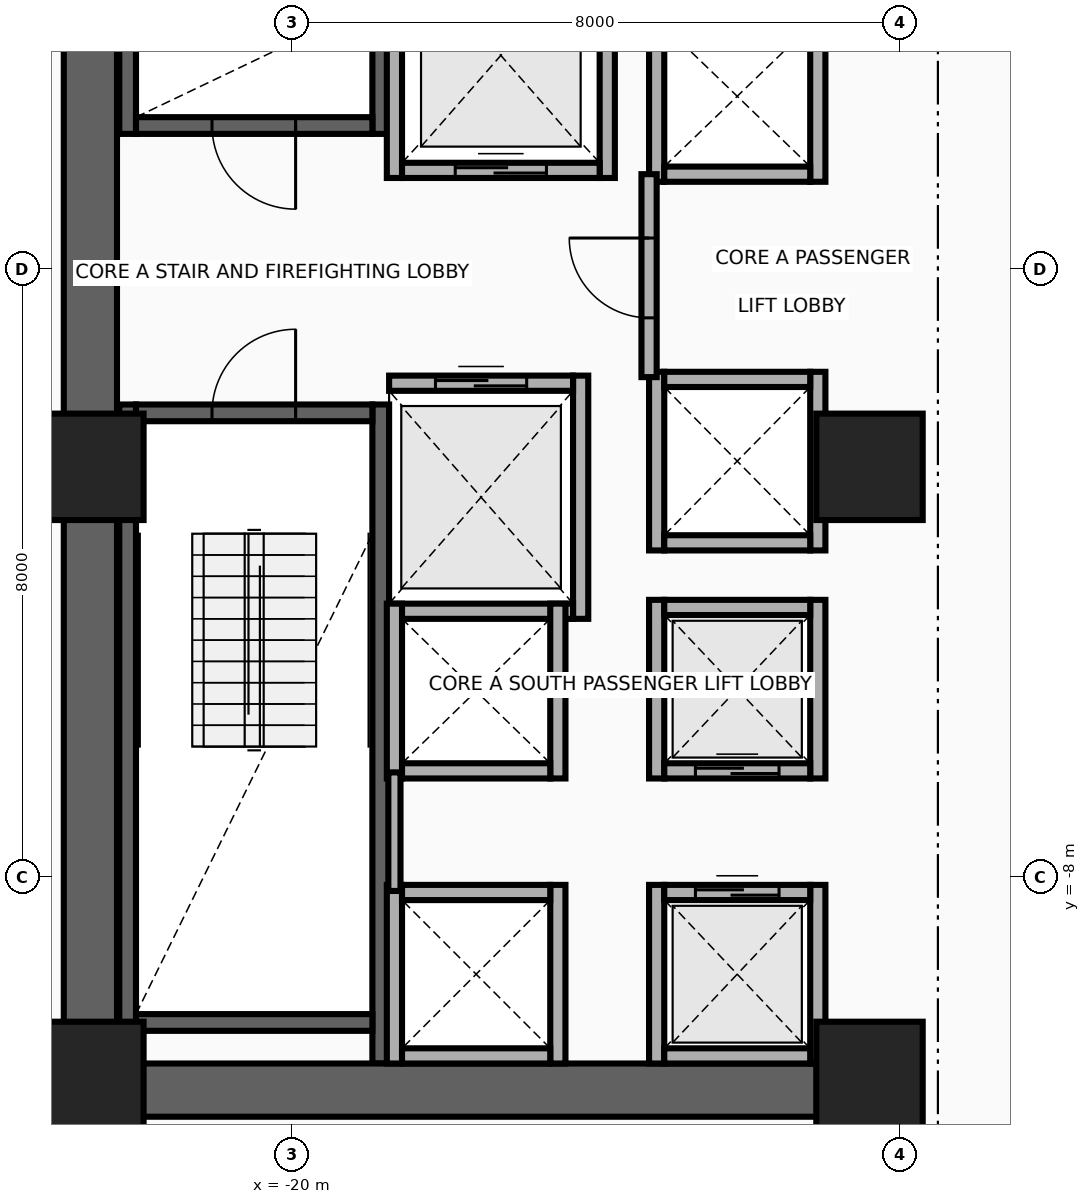
"""IFC4 building model, lengths in metres.
Left out: names, types, materials, properties, quantities, classifications, styles, units other than length and angle.
Written with IfcOpenShell. Run it as: python <this file> out.ifc"""

import sys

from ifc_helpers import new_model, si_unit, direction, frame, frame_2d, origin, origin_2d, place, context, subcontext, project, spatial, rectangle, extrude, source, transform, mapped, element, fill, save


model = new_model("IFC4")
c1 = context("Model", 3, precision=1e-05, world=origin(), true_north=direction((0.0, 1.0)))
c2 = subcontext(c1, "Body", "Model", "MODEL_VIEW")
j1 = project(units=[si_unit("LENGTHUNIT", "METRE"), si_unit("PLANEANGLEUNIT", "RADIAN")], contexts=[c1])
p1 = place(None, origin())
s1 = spatial("IfcSite", under=j1, at=p1, CompositionType="ELEMENT")
p2 = place(p1, origin())
s2 = spatial("IfcBuilding", under=s1, at=p2, CompositionType="ELEMENT")
p3 = place(p2, frame((0.0, 0.0, 74.1)))
s3 = spatial("IfcBuildingStorey", under=s2, at=p3, CompositionType="ELEMENT", Elevation=74.1)
for number, where, z_axis, x_axis in (
    (1, (-22.16, 1.78, 0.0), (0.0, 0.0, 1.0), (0.0, 1.0, 0.0)),
    (2, (-18.83, 1.78, 0.0), (0.0, 0.0, 1.0), (0.0, 1.0, 0.0)),
):
    element("IfcWall", number, at=place(p3, frame(where, z_axis=z_axis, x_axis=x_axis)), inside=s3, PredefinedType="SHEAR", context=c2, shape_type="SweptSolid", body=[
        extrude(rectangle(XDim=8.67, YDim=0.22, at=frame_2d((4.335, 0.0))), origin(), (0.0, 0.0, 1.0), 3.46),
    ])
p4 = place(p3, frame((-22.05, 1.89, 0.0), z_axis=(0.0, 0.0, 1.0), x_axis=(1.0, 0.0, 0.0)))
e3 = element("IfcWall", 3, at=p4, inside=s3, PredefinedType="SHEAR", context=c2, shape_type="SweptSolid", body=[
    extrude(rectangle(XDim=3.11, YDim=0.22, at=frame_2d((1.555, 0.0))), origin(), (0.0, 0.0, 1.0), 3.46),
])
p5 = place(p4, frame((1.0, 0.0, 0.0)))
e4 = element("IfcOpeningElement", 4, at=p5, cuts=e3, PredefinedType="OPENING", context=c2, shape_type="SweptSolid", body=[
    extrude(rectangle(XDim=1.1, YDim=2.15, at=frame_2d((0.55, 1.075))), frame((0.0, 0.125, 0.0), z_axis=(0.0, -1.0, 0.0), x_axis=(1.0, 0.0, 0.0)), (0.0, 0.0, 1.0), 0.25),
])
for number, where, z_axis, x_axis in (
    (5, (-22.16, -10.45, 0.0), (0.0, 0.0, 1.0), (0.0, 1.0, 0.0)),
    (6, (-18.83, -10.45, 0.0), (0.0, 0.0, 1.0), (0.0, 1.0, 0.0)),
):
    element("IfcWall", number, at=place(p3, frame(where, z_axis=z_axis, x_axis=x_axis)), inside=s3, PredefinedType="SHEAR", context=c2, shape_type="SweptSolid", body=[
        extrude(rectangle(XDim=8.67, YDim=0.22, at=frame_2d((4.335, 0.0))), origin(), (0.0, 0.0, 1.0), 3.46),
    ])
p6 = place(p3, frame((-22.05, -9.91, 0.0), z_axis=(0.0, 0.0, 1.0), x_axis=(1.0, 0.0, 0.0)))
e7 = element("IfcWall", 7, at=p6, inside=s3, PredefinedType="SHEAR", context=c2, shape_type="SweptSolid", body=[
    extrude(rectangle(XDim=3.11, YDim=0.22, at=frame_2d((1.555, 0.0))), origin(), (0.0, 0.0, 1.0), 3.46),
])
p7 = place(p3, frame((-22.05, -1.89, 0.0), z_axis=(0.0, 0.0, 1.0), x_axis=(1.0, 0.0, 0.0)))
e8 = element("IfcWall", 8, at=p7, inside=s3, PredefinedType="SHEAR", context=c2, shape_type="SweptSolid", body=[
    extrude(rectangle(XDim=3.11, YDim=0.22, at=frame_2d((1.555, 0.0))), origin(), (0.0, 0.0, 1.0), 3.46),
])
p8 = place(p7, frame((1.0, 0.0, 0.0)))
e9 = element("IfcOpeningElement", 9, at=p8, cuts=e8, PredefinedType="OPENING", context=c2, shape_type="SweptSolid", body=[
    extrude(rectangle(XDim=1.1, YDim=2.15, at=frame_2d((0.55, 1.075))), frame((0.0, 0.125, 0.0), z_axis=(0.0, -1.0, 0.0), x_axis=(1.0, 0.0, 0.0)), (0.0, 0.0, 1.0), 0.25),
])
p9 = place(p3, frame((-22.65, -11.15, 0.0), z_axis=(0.0, 0.0, 1.0), x_axis=(0.0, 1.0, 0.0)))
e10 = element("IfcWall", 10, at=p9, inside=s3, PredefinedType="SHEAR", context=c2, shape_type="SweptSolid", body=[
    extrude(rectangle(XDim=22.3, YDim=0.7, at=frame_2d((11.15, 0.0))), origin(), (0.0, 0.0, 1.0), 3.46),
])
p10 = place(p3, frame((-22.65, -10.8, 0.0), z_axis=(0.0, 0.0, 1.0), x_axis=(1.0, 0.0, 0.0)))
e11 = element("IfcWall", 11, at=p10, inside=s3, PredefinedType="SHEAR", context=c2, shape_type="SweptSolid", body=[
    extrude(rectangle(XDim=10.25, YDim=0.7, at=frame_2d((5.125, 0.0))), origin(), (0.0, 0.0, 1.0), 3.46),
])
m1 = source(origin(), c2, "Body", "SweptSolid", [
    extrude(rectangle(XDim=1.4, YDim=1.4, at=origin_2d()), origin(), (0.0, 0.0, 1.0), 3.7),
])
for number, where, z_axis, x_axis in (
    (12, (-22.65, -10.6, 0.0), (0.0, 0.0, 1.0), (1.0, 0.0, 0.0)),
    (13, (-12.4, -10.6, 0.0), (0.0, 0.0, 1.0), (1.0, 0.0, 0.0)),
    (14, (-22.65, -2.6, 0.0), (0.0, 0.0, 1.0), (1.0, 0.0, 0.0)),
    (15, (-12.4, -2.6, 0.0), (0.0, 0.0, 1.0), (1.0, 0.0, 0.0)),
):
    element("IfcColumn", number, at=place(p3, frame(where, z_axis=z_axis, x_axis=x_axis)), inside=s3, PredefinedType="COLUMN", context=c2, shape_type="MappedRepresentation", body=[
        mapped(m1, transform((0.0, 0.0, 0.0), x_axis=(1.0, 0.0, 0.0), y_axis=(0.0, 1.0, 0.0), z_axis=(0.0, 0.0, 1.0), scale=1.0)),
    ])
for number, where, z_axis, x_axis in (
    (16, (-18.65, 1.2, 0.0), (0.0, 0.0, 1.0), (0.0, 1.0, 0.0)),
    (17, (-15.85, 1.2, 0.0), (0.0, 0.0, 1.0), (0.0, 1.0, 0.0)),
):
    element("IfcWall", number, at=place(p3, frame(where, z_axis=z_axis, x_axis=x_axis)), inside=s3, PredefinedType="MOVABLE", context=c2, shape_type="SweptSolid", body=[
        extrude(rectangle(XDim=3.225, YDim=0.2, at=frame_2d((1.613, 0.0))), origin(), (0.0, 0.0, 1.0), 3.46),
    ])
p11 = place(p3, frame((-18.55, 1.3, 0.0), z_axis=(0.0, 0.0, 1.0), x_axis=(1.0, 0.0, 0.0)))
e18 = element("IfcWall", 18, at=p11, inside=s3, PredefinedType="MOVABLE", context=c2, shape_type="SweptSolid", body=[
    extrude(rectangle(XDim=2.6, YDim=0.2, at=frame_2d((1.3, 0.0))), origin(), (0.0, 0.0, 1.0), 3.46),
])
p12 = place(p11, frame((0.7, 0.0, 0.0)))
e19 = element("IfcOpeningElement", 19, at=p12, cuts=e18, PredefinedType="OPENING", context=c2, shape_type="SweptSolid", body=[
    extrude(rectangle(XDim=1.2, YDim=2.1, at=frame_2d((0.6, 1.05))), frame((0.0, 0.115, 0.0), z_axis=(0.0, -1.0, 0.0), x_axis=(1.0, 0.0, 0.0)), (0.0, 0.0, 1.0), 0.23),
])
p13 = place(p3, frame((-16.2, -4.6, 0.0), z_axis=(0.0, 0.0, 1.0), x_axis=(0.0, 1.0, 0.0)))
e20 = element("IfcWall", 20, at=p13, inside=s3, PredefinedType="MOVABLE", context=c2, shape_type="SweptSolid", body=[
    extrude(rectangle(XDim=3.2, YDim=0.2, at=frame_2d((1.6, 0.0))), origin(), (0.0, 0.0, 1.0), 3.46),
])
p14 = place(p3, frame((-18.72, -4.5, 0.0), z_axis=(0.0, 0.0, 1.0), x_axis=(1.0, 0.0, 0.0)))
e21 = element("IfcWall", 21, at=p14, inside=s3, PredefinedType="MOVABLE", context=c2, shape_type="SweptSolid", body=[
    extrude(rectangle(XDim=2.42, YDim=0.2, at=frame_2d((1.21, 0.0))), origin(), (0.0, 0.0, 1.0), 3.46),
])
p15 = place(p3, frame((-18.72, -1.5, 0.0), z_axis=(0.0, 0.0, 1.0), x_axis=(1.0, 0.0, 0.0)))
e22 = element("IfcWall", 22, at=p15, inside=s3, PredefinedType="MOVABLE", context=c2, shape_type="SweptSolid", body=[
    extrude(rectangle(XDim=2.42, YDim=0.2, at=frame_2d((1.21, 0.0))), origin(), (0.0, 0.0, 1.0), 3.46),
])
p16 = place(p15, frame((0.61, 0.0, 0.0)))
e23 = element("IfcOpeningElement", 23, at=p16, cuts=e22, PredefinedType="OPENING", context=c2, shape_type="SweptSolid", body=[
    extrude(rectangle(XDim=1.2, YDim=2.1, at=frame_2d((0.6, 1.05))), frame((0.0, 0.115, 0.0), z_axis=(0.0, -1.0, 0.0), x_axis=(1.0, 0.0, 0.0)), (0.0, 0.0, 1.0), 0.23),
])
for number, where, z_axis, x_axis in (
    (24, (-15.2, -10.45, 0.0), (0.0, 0.0, 1.0), (0.0, 1.0, 0.0)),
    (25, (-13.08, -10.45, 0.0), (0.0, 0.0, 1.0), (0.0, 1.0, 0.0)),
):
    element("IfcWall", number, at=place(p3, frame(where, z_axis=z_axis, x_axis=x_axis)), inside=s3, PredefinedType="MOVABLE", context=c2, shape_type="SweptSolid", body=[
        extrude(rectangle(XDim=2.35, YDim=0.2, at=frame_2d((1.175, 0.0))), origin(), (0.0, 0.0, 1.0), 2.583),
    ])
p17 = place(p3, frame((-15.1, -10.35, 0.0), z_axis=(0.0, 0.0, 1.0), x_axis=(1.0, 0.0, 0.0)))
e26 = element("IfcWall", 26, at=p17, inside=s3, PredefinedType="MOVABLE", context=c2, shape_type="SweptSolid", body=[
    extrude(rectangle(XDim=1.92, YDim=0.2, at=frame_2d((0.96, 0.0))), origin(), (0.0, 0.0, 1.0), 2.583),
])
p18 = place(p3, frame((-15.1, -8.2, 0.0), z_axis=(0.0, 0.0, 1.0), x_axis=(1.0, 0.0, 0.0)))
e27 = element("IfcWall", 27, at=p18, inside=s3, PredefinedType="MOVABLE", context=c2, shape_type="SweptSolid", body=[
    extrude(rectangle(XDim=1.92, YDim=0.2, at=frame_2d((0.96, 0.0))), origin(), (0.0, 0.0, 1.0), 3.46),
])
p19 = place(p18, frame((0.41, 0.0, 0.0)))
e28 = element("IfcOpeningElement", 28, at=p19, cuts=e27, PredefinedType="OPENING", context=c2, shape_type="SweptSolid", body=[
    extrude(rectangle(XDim=1.1, YDim=2.1, at=frame_2d((0.55, 1.05))), frame((0.0, 0.115, 0.0), z_axis=(0.0, -1.0, 0.0), x_axis=(1.0, 0.0, 0.0)), (0.0, 0.0, 1.0), 0.23),
])
for number, where, z_axis, x_axis in (
    (29, (-15.2, -6.7, 0.0), (0.0, 0.0, 1.0), (0.0, 1.0, 0.0)),
    (30, (-13.08, -6.7, 0.0), (0.0, 0.0, 1.0), (0.0, 1.0, 0.0)),
):
    element("IfcWall", number, at=place(p3, frame(where, z_axis=z_axis, x_axis=x_axis)), inside=s3, PredefinedType="MOVABLE", context=c2, shape_type="SweptSolid", body=[
        extrude(rectangle(XDim=2.35, YDim=0.2, at=frame_2d((1.175, 0.0))), origin(), (0.0, 0.0, 1.0), 3.46),
    ])
p20 = place(p3, frame((-15.1, -6.6, 0.0), z_axis=(0.0, 0.0, 1.0), x_axis=(1.0, 0.0, 0.0)))
e31 = element("IfcWall", 31, at=p20, inside=s3, PredefinedType="MOVABLE", context=c2, shape_type="SweptSolid", body=[
    extrude(rectangle(XDim=1.92, YDim=0.2, at=frame_2d((0.96, 0.0))), origin(), (0.0, 0.0, 1.0), 3.46),
])
p21 = place(p20, frame((0.41, 0.0, 0.0)))
e32 = element("IfcOpeningElement", 32, at=p21, cuts=e31, PredefinedType="OPENING", context=c2, shape_type="SweptSolid", body=[
    extrude(rectangle(XDim=1.1, YDim=2.1, at=frame_2d((0.55, 1.05))), frame((0.0, 0.115, 0.0), z_axis=(0.0, -1.0, 0.0), x_axis=(1.0, 0.0, 0.0)), (0.0, 0.0, 1.0), 0.23),
])
p22 = place(p3, frame((-15.1, -4.45, 0.0), z_axis=(0.0, 0.0, 1.0), x_axis=(1.0, 0.0, 0.0)))
e33 = element("IfcWall", 33, at=p22, inside=s3, PredefinedType="MOVABLE", context=c2, shape_type="SweptSolid", body=[
    extrude(rectangle(XDim=1.92, YDim=0.2, at=frame_2d((0.96, 0.0))), origin(), (0.0, 0.0, 1.0), 3.46),
])
for number, where, z_axis, x_axis in (
    (34, (-18.65, -10.45, 0.0), (0.0, 0.0, 1.0), (0.0, 1.0, 0.0)),
    (35, (-16.5, -10.45, 0.0), (0.0, 0.0, 1.0), (0.0, 1.0, 0.0)),
):
    element("IfcWall", number, at=place(p3, frame(where, z_axis=z_axis, x_axis=x_axis)), inside=s3, PredefinedType="MOVABLE", context=c2, shape_type="SweptSolid", body=[
        extrude(rectangle(XDim=2.35, YDim=0.2, at=frame_2d((1.175, 0.0))), origin(), (0.0, 0.0, 1.0), 2.583),
    ])
p23 = place(p3, frame((-18.55, -10.35, 0.0), z_axis=(0.0, 0.0, 1.0), x_axis=(1.0, 0.0, 0.0)))
e36 = element("IfcWall", 36, at=p23, inside=s3, PredefinedType="MOVABLE", context=c2, shape_type="SweptSolid", body=[
    extrude(rectangle(XDim=1.95, YDim=0.2, at=frame_2d((0.975, 0.0))), origin(), (0.0, 0.0, 1.0), 2.583),
])
p24 = place(p3, frame((-18.55, -8.2, 0.0), z_axis=(0.0, 0.0, 1.0), x_axis=(1.0, 0.0, 0.0)))
e37 = element("IfcWall", 37, at=p24, inside=s3, PredefinedType="MOVABLE", context=c2, shape_type="SweptSolid", body=[
    extrude(rectangle(XDim=1.95, YDim=0.2, at=frame_2d((0.975, 0.0))), origin(), (0.0, 0.0, 1.0), 3.46),
])
for number, where, z_axis, x_axis in (
    (38, (-15.2, 1.15, 0.0), (0.0, 0.0, 1.0), (0.0, 1.0, 0.0)),
    (39, (-13.08, 1.15, 0.0), (0.0, 0.0, 1.0), (0.0, 1.0, 0.0)),
):
    element("IfcWall", number, at=place(p3, frame(where, z_axis=z_axis, x_axis=x_axis)), inside=s3, PredefinedType="MOVABLE", context=c2, shape_type="SweptSolid", body=[
        extrude(rectangle(XDim=2.25, YDim=0.2, at=frame_2d((1.125, 0.0))), origin(), (0.0, 0.0, 1.0), 3.46),
    ])
p25 = place(p3, frame((-15.1, 1.25, 0.0), z_axis=(0.0, 0.0, 1.0), x_axis=(1.0, 0.0, 0.0)))
e40 = element("IfcWall", 40, at=p25, inside=s3, PredefinedType="MOVABLE", context=c2, shape_type="SweptSolid", body=[
    extrude(rectangle(XDim=1.92, YDim=0.2, at=frame_2d((0.96, 0.0))), origin(), (0.0, 0.0, 1.0), 3.46),
])
for number, where, z_axis, x_axis in (
    (41, (-18.65, -6.7, 0.0), (0.0, 0.0, 1.0), (0.0, 1.0, 0.0)),
    (42, (-16.5, -6.7, 0.0), (0.0, 0.0, 1.0), (0.0, 1.0, 0.0)),
):
    element("IfcWall", number, at=place(p3, frame(where, z_axis=z_axis, x_axis=x_axis)), inside=s3, PredefinedType="MOVABLE", context=c2, shape_type="SweptSolid", body=[
        extrude(rectangle(XDim=2.3, YDim=0.2, at=frame_2d((1.15, 0.0))), origin(), (0.0, 0.0, 1.0), 3.46),
    ])
p26 = place(p3, frame((-18.55, -6.6, 0.0), z_axis=(0.0, 0.0, 1.0), x_axis=(1.0, 0.0, 0.0)))
e43 = element("IfcWall", 43, at=p26, inside=s3, PredefinedType="MOVABLE", context=c2, shape_type="SweptSolid", body=[
    extrude(rectangle(XDim=1.95, YDim=0.2, at=frame_2d((0.975, 0.0))), origin(), (0.0, 0.0, 1.0), 3.46),
])
for number, where, z_axis, x_axis in (
    (44, (-15.2, -3.7, 0.0), (0.0, 0.0, 1.0), (0.0, 1.0, 0.0)),
    (45, (-13.08, -3.7, 0.0), (0.0, 0.0, 1.0), (0.0, 1.0, 0.0)),
):
    element("IfcWall", number, at=place(p3, frame(where, z_axis=z_axis, x_axis=x_axis)), inside=s3, PredefinedType="MOVABLE", context=c2, shape_type="SweptSolid", body=[
        extrude(rectangle(XDim=2.35, YDim=0.2, at=frame_2d((1.175, 0.0))), origin(), (0.0, 0.0, 1.0), 3.46),
    ])
for number, where, z_axis, x_axis in (
    (46, (-15.1, -3.6, 0.0), (0.0, 0.0, 1.0), (1.0, 0.0, 0.0)),
    (47, (-15.1, -1.45, 0.0), (0.0, 0.0, 1.0), (1.0, 0.0, 0.0)),
):
    element("IfcWall", number, at=place(p3, frame(where, z_axis=z_axis, x_axis=x_axis)), inside=s3, PredefinedType="MOVABLE", context=c2, shape_type="SweptSolid", body=[
        extrude(rectangle(XDim=1.92, YDim=0.2, at=frame_2d((0.96, 0.0))), origin(), (0.0, 0.0, 1.0), 3.46),
    ])
p27 = place(p3, frame((-15.3, -1.42, 0.0), z_axis=(0.0, 0.0, 1.0), x_axis=(0.0, 1.0, 0.0)))
e48 = element("IfcWall", 48, at=p27, inside=s3, PredefinedType="PARTITIONING", context=c2, shape_type="SweptSolid", body=[
    extrude(rectangle(XDim=2.67, YDim=0.2, at=frame_2d((1.335, 0.0))), origin(), (0.0, 0.0, 1.0), 3.46),
])
p28 = place(p27, frame((0.78, 0.0, 0.0)))
e49 = element("IfcOpeningElement", 49, at=p28, cuts=e48, PredefinedType="OPENING", context=c2, shape_type="SweptSolid", body=[
    extrude(rectangle(XDim=1.05, YDim=2.15, at=frame_2d((0.525, 1.075))), frame((0.0, 0.115, 0.0), z_axis=(0.0, -1.0, 0.0), x_axis=(1.0, 0.0, 0.0)), (0.0, 0.0, 1.0), 0.23),
])
p29 = place(p3, frame((-18.65, -8.18, 0.0), z_axis=(0.0, 0.0, 1.0), x_axis=(0.0, 1.0, 0.0)))
e50 = element("IfcWall", 50, at=p29, inside=s3, PredefinedType="PARTITIONING", context=c2, shape_type="SweptSolid", body=[
    extrude(rectangle(XDim=1.56, YDim=0.16, at=frame_2d((0.78, 0.0))), origin(), (0.0, 0.0, 1.0), 3.46),
])
p30 = place(p12, origin())
e51 = element("IfcDoor", 51, at=p30, inside=s3, OperationType="DOUBLE_DOOR_SLIDING", PredefinedType="DOOR", context=c2, shape_type="SweptSolid", body=[
    extrude(rectangle(XDim=1.2, YDim=2.1, at=frame_2d((0.6, 1.05))), frame((0.0, 0.025, 0.0), z_axis=(0.0, -1.0, 0.0), x_axis=(1.0, 0.0, 0.0)), (0.0, 0.0, 1.0), 0.05),
])
fill(e19, e51)
p31 = place(p16, origin())
e52 = element("IfcDoor", 52, at=p31, inside=s3, OperationType="DOUBLE_DOOR_SLIDING", PredefinedType="DOOR", context=c2, shape_type="SweptSolid", body=[
    extrude(rectangle(XDim=1.2, YDim=2.1, at=frame_2d((0.6, 1.05))), frame((0.0, 0.025, 0.0), z_axis=(0.0, -1.0, 0.0), x_axis=(1.0, 0.0, 0.0)), (0.0, 0.0, 1.0), 0.05),
])
fill(e23, e52)
p32 = place(p19, origin())
e53 = element("IfcDoor", 53, at=p32, inside=s3, OperationType="DOUBLE_DOOR_SLIDING", PredefinedType="DOOR", context=c2, shape_type="SweptSolid", body=[
    extrude(rectangle(XDim=1.1, YDim=2.1, at=frame_2d((0.55, 1.05))), frame((0.0, 0.025, 0.0), z_axis=(0.0, -1.0, 0.0), x_axis=(1.0, 0.0, 0.0)), (0.0, 0.0, 1.0), 0.05),
])
fill(e28, e53)
p33 = place(p21, origin())
e54 = element("IfcDoor", 54, at=p33, inside=s3, OperationType="DOUBLE_DOOR_SLIDING", PredefinedType="DOOR", context=c2, shape_type="SweptSolid", body=[
    extrude(rectangle(XDim=1.1, YDim=2.1, at=frame_2d((0.55, 1.05))), frame((0.0, 0.025, 0.0), z_axis=(0.0, -1.0, 0.0), x_axis=(1.0, 0.0, 0.0)), (0.0, 0.0, 1.0), 0.05),
])
fill(e32, e54)
p34 = place(p28, origin())
e55 = element("IfcDoor", 55, at=p34, inside=s3, OperationType="SINGLE_SWING_RIGHT", PredefinedType="DOOR", context=c2, shape_type="SweptSolid", body=[
    extrude(rectangle(XDim=1.05, YDim=2.15, at=frame_2d((0.525, 1.075))), frame((0.0, 0.025, 0.0), z_axis=(0.0, -1.0, 0.0), x_axis=(1.0, 0.0, 0.0)), (0.0, 0.0, 1.0), 0.05),
])
fill(e49, e55)
p35 = place(p5, frame((1.1, 0.0, 0.0), z_axis=(0.0, 0.0, 1.0), x_axis=(-1.0, 0.0, 0.0)))
e56 = element("IfcDoor", 56, at=p35, inside=s3, OperationType="SINGLE_SWING_LEFT", PredefinedType="DOOR", context=c2, shape_type="SweptSolid", body=[
    extrude(rectangle(XDim=1.1, YDim=2.15, at=frame_2d((0.55, 1.075))), frame((0.0, 0.025, 0.0), z_axis=(0.0, -1.0, 0.0), x_axis=(1.0, 0.0, 0.0)), (0.0, 0.0, 1.0), 0.05),
])
fill(e4, e56)
p36 = place(p8, origin())
e57 = element("IfcDoor", 57, at=p36, inside=s3, OperationType="SINGLE_SWING_RIGHT", PredefinedType="DOOR", context=c2, shape_type="SweptSolid", body=[
    extrude(rectangle(XDim=1.1, YDim=2.15, at=frame_2d((0.55, 1.075))), frame((0.0, 0.025, 0.0), z_axis=(0.0, -1.0, 0.0), x_axis=(1.0, 0.0, 0.0)), (0.0, 0.0, 1.0), 0.05),
])
fill(e9, e57)
save(model, sys.argv[1])
